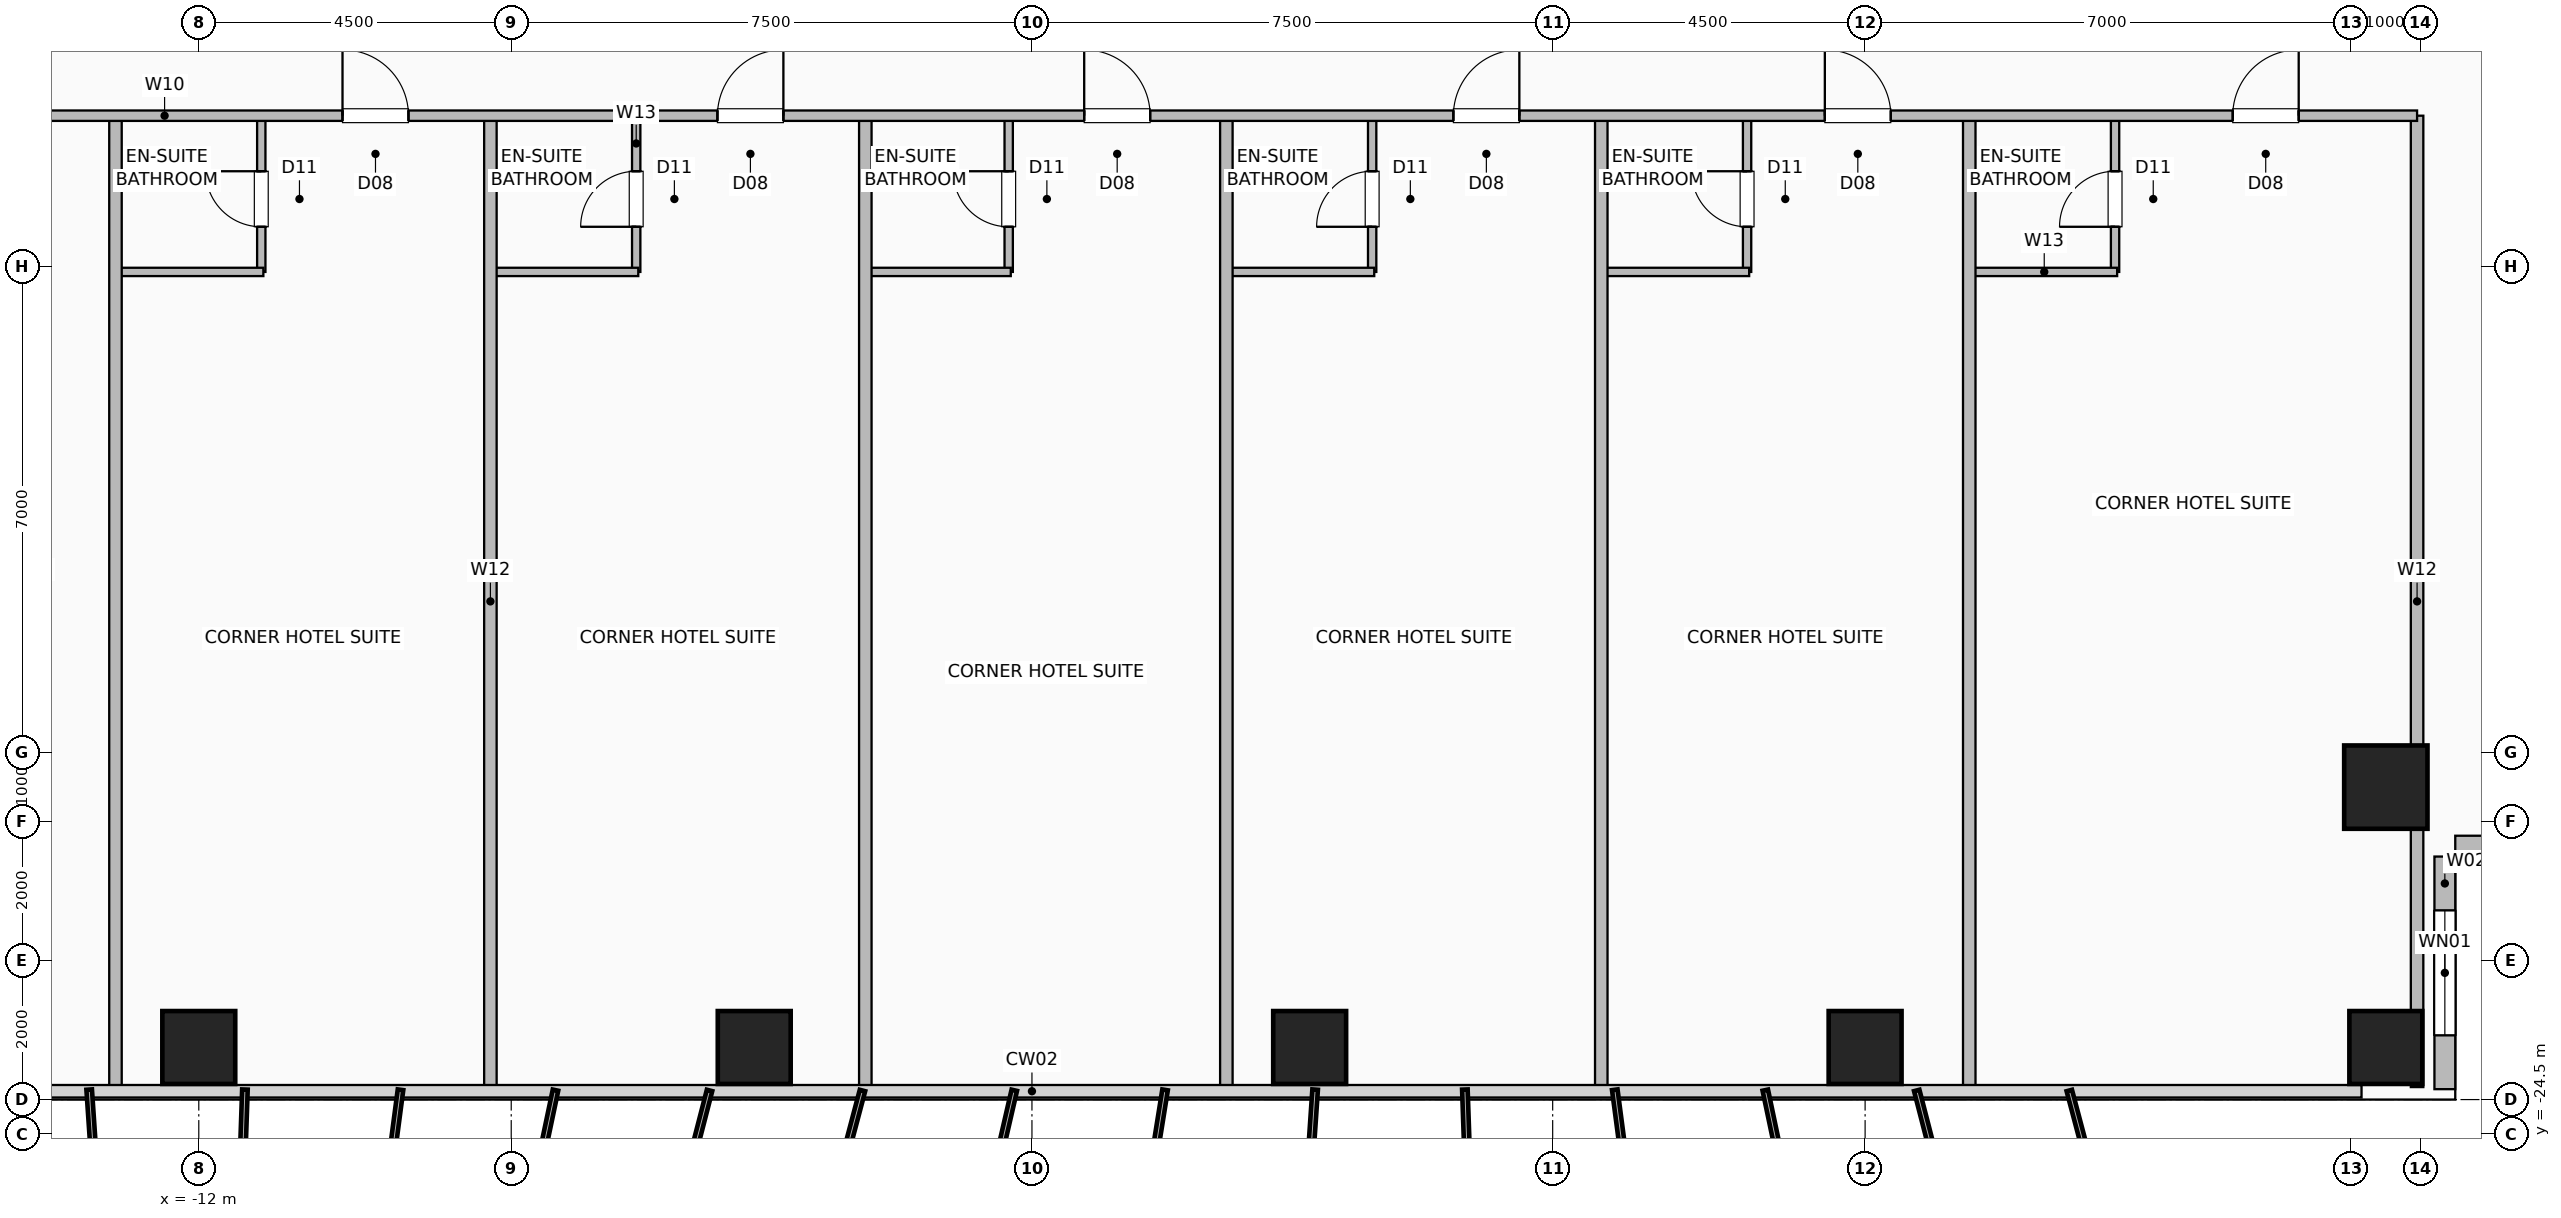
"""IFC4 building model, lengths in metres.
Left out: names, types, materials, properties, quantities, classifications, styles, units other than length and angle.
Written with IfcOpenShell. Run it as: python <this file> out.ifc"""

import sys

from ifc_helpers import new_model, si_unit, direction, frame, frame_2d, origin, origin_2d, place, context, subcontext, project, spatial, rectangle, hollow_rectangle, extrude, element, fill, save


model = new_model("IFC4")
c1 = context("Model", 3, precision=1e-05, world=origin(), true_north=direction((0.0, 1.0)))
c2 = subcontext(c1, "Body", "Model", "MODEL_VIEW")
j1 = project(units=[si_unit("LENGTHUNIT", "METRE"), si_unit("PLANEANGLEUNIT", "RADIAN")], contexts=[c1])
p1 = place(None, origin())
s1 = spatial("IfcSite", under=j1, at=p1, CompositionType="ELEMENT")
p2 = place(p1, origin())
s2 = spatial("IfcBuilding", under=s1, at=p2, CompositionType="ELEMENT")
p3 = place(p2, frame((0.0, 0.0, 79.5)))
s3 = spatial("IfcBuildingStorey", under=s2, at=p3, CompositionType="ELEMENT", Elevation=79.5)
for number, where, z_axis, x_axis in (
    (1, (-12.0, -23.25, 0.0), (0.0, 0.0, 1.0), (1.0, 0.0, 0.0)),
    (2, (-4.0, -23.25, 0.0), (0.0, 0.0, 1.0), (1.0, 0.0, 0.0)),
    (3, (4.0, -23.25, 0.0), (0.0, 0.0, 1.0), (1.0, 0.0, 0.0)),
    (4, (12.0, -23.25, 0.0), (0.0, 0.0, 1.0), (1.0, 0.0, 0.0)),
    (5, (19.5, -23.25, 0.0), (0.0, 0.0, 1.0), (1.0, 0.0, 0.0)),
):
    element("IfcColumn", number, at=place(p3, frame(where, z_axis=z_axis, x_axis=x_axis)), inside=s3, PredefinedType="COLUMN", context=c2, shape_type="SweptSolid", body=[
        extrude(hollow_rectangle(XDim=1.05, YDim=1.05, WallThickness=0.05, at=origin_2d()), origin(), (0.0, 0.0, 1.0), 3.5),
    ])
p4 = place(p3, frame((19.5, -19.5, 0.0), z_axis=(0.0, 0.0, 1.0), x_axis=(1.0, 0.0, 0.0)))
e6 = element("IfcColumn", 6, at=p4, inside=s3, PredefinedType="COLUMN", context=c2, shape_type="SweptSolid", body=[
    extrude(hollow_rectangle(XDim=1.2, YDim=1.2, WallThickness=0.055, at=origin_2d()), origin(), (0.0, 0.0, 1.0), 3.5),
])
p5 = place(p3, frame((20.35, -23.85, 0.0), z_axis=(0.0, 0.0, 1.0), x_axis=(0.0, 1.0, 0.0)))
e7 = element("IfcWall", 7, at=p5, inside=s3, PredefinedType="SOLIDWALL", context=c2, shape_type="SweptSolid", body=[
    extrude(rectangle(XDim=3.35, YDim=0.3, at=frame_2d((1.675, 0.0))), origin(), (0.0, 0.0, 1.0), 3.15),
])
p6 = place(p5, frame((0.775, 0.0, 0.9)))
e8 = element("IfcOpeningElement", 8, at=p6, cuts=e7, PredefinedType="OPENING", context=c2, shape_type="SweptSolid", body=[
    extrude(rectangle(XDim=1.8, YDim=1.8, at=frame_2d((0.9, 0.9))), frame((0.0, 0.16, 0.0), z_axis=(0.0, -1.0, 0.0), x_axis=(1.0, 0.0, 0.0)), (0.0, 0.0, 1.0), 0.32),
])
p7 = place(p3, frame((23.85, -20.35, 0.0), z_axis=(0.0, 0.0, 1.0), x_axis=(-1.0, 0.0, 0.0)))
e9 = element("IfcWall", 9, at=p7, inside=s3, PredefinedType="SOLIDWALL", context=c2, shape_type="SweptSolid", body=[
    extrude(rectangle(XDim=3.35, YDim=0.3, at=frame_2d((1.675, 0.0))), origin(), (0.0, 0.0, 1.0), 3.15),
])
p8 = place(p3, frame((-11.1, -12.08, 0.0), z_axis=(0.0, 0.0, 1.0), x_axis=(0.0, 1.0, 0.0)))
e10 = element("IfcWall", 10, at=p8, inside=s3, PredefinedType="PLUMBINGWALL", context=c2, shape_type="SweptSolid", body=[
    extrude(rectangle(XDim=2.25, YDim=0.12, at=frame_2d((1.125, 0.0))), origin(), (0.0, 0.0, 1.0), 3.15),
])
p9 = place(p8, frame((0.65, 0.0, 0.0)))
e11 = element("IfcOpeningElement", 11, at=p9, cuts=e10, PredefinedType="OPENING", context=c2, shape_type="SweptSolid", body=[
    extrude(rectangle(XDim=0.8, YDim=2.05, at=frame_2d((0.4, 1.025))), frame((0.0, 0.07, 0.0), z_axis=(0.0, -1.0, 0.0), x_axis=(1.0, 0.0, 0.0)), (0.0, 0.0, 1.0), 0.14),
])
p10 = place(p3, frame((-13.17, -12.08, 0.0), z_axis=(0.0, 0.0, 1.0), x_axis=(1.0, 0.0, 0.0)))
e12 = element("IfcWall", 12, at=p10, inside=s3, PredefinedType="PLUMBINGWALL", context=c2, shape_type="SweptSolid", body=[
    extrude(rectangle(XDim=2.1, YDim=0.12, at=frame_2d((1.05, 0.0))), origin(), (0.0, 0.0, 1.0), 3.15),
])
p11 = place(p3, frame((-5.7, -12.08, 0.0), z_axis=(0.0, 0.0, 1.0), x_axis=(0.0, 1.0, 0.0)))
e13 = element("IfcWall", 13, at=p11, inside=s3, PredefinedType="PLUMBINGWALL", context=c2, shape_type="SweptSolid", body=[
    extrude(rectangle(XDim=2.25, YDim=0.12, at=frame_2d((1.125, 0.0))), origin(), (0.0, 0.0, 1.0), 3.15),
])
p12 = place(p11, frame((0.65, 0.0, 0.0)))
e14 = element("IfcOpeningElement", 14, at=p12, cuts=e13, PredefinedType="OPENING", context=c2, shape_type="SweptSolid", body=[
    extrude(rectangle(XDim=0.8, YDim=2.05, at=frame_2d((0.4, 1.025))), frame((0.0, 0.07, 0.0), z_axis=(0.0, -1.0, 0.0), x_axis=(1.0, 0.0, 0.0)), (0.0, 0.0, 1.0), 0.14),
])
p13 = place(p3, frame((-7.77, -12.08, 0.0), z_axis=(0.0, 0.0, 1.0), x_axis=(1.0, 0.0, 0.0)))
e15 = element("IfcWall", 15, at=p13, inside=s3, PredefinedType="PLUMBINGWALL", context=c2, shape_type="SweptSolid", body=[
    extrude(rectangle(XDim=2.1, YDim=0.12, at=frame_2d((1.05, 0.0))), origin(), (0.0, 0.0, 1.0), 3.15),
])
p14 = place(p3, frame((-0.335, -12.08, 0.0), z_axis=(0.0, 0.0, 1.0), x_axis=(0.0, 1.0, 0.0)))
e16 = element("IfcWall", 16, at=p14, inside=s3, PredefinedType="PLUMBINGWALL", context=c2, shape_type="SweptSolid", body=[
    extrude(rectangle(XDim=2.25, YDim=0.12, at=frame_2d((1.125, 0.0))), origin(), (0.0, 0.0, 1.0), 3.15),
])
p15 = place(p14, frame((0.65, 0.0, 0.0)))
e17 = element("IfcOpeningElement", 17, at=p15, cuts=e16, PredefinedType="OPENING", context=c2, shape_type="SweptSolid", body=[
    extrude(rectangle(XDim=0.8, YDim=2.05, at=frame_2d((0.4, 1.025))), frame((0.0, 0.07, 0.0), z_axis=(0.0, -1.0, 0.0), x_axis=(1.0, 0.0, 0.0)), (0.0, 0.0, 1.0), 0.14),
])
p16 = place(p3, frame((-2.37, -12.08, 0.0), z_axis=(0.0, 0.0, 1.0), x_axis=(1.0, 0.0, 0.0)))
e18 = element("IfcWall", 18, at=p16, inside=s3, PredefinedType="PLUMBINGWALL", context=c2, shape_type="SweptSolid", body=[
    extrude(rectangle(XDim=2.065, YDim=0.12, at=frame_2d((1.033, 0.0))), origin(), (0.0, 0.0, 1.0), 3.15),
])
p17 = place(p3, frame((4.9, -12.08, 0.0), z_axis=(0.0, 0.0, 1.0), x_axis=(0.0, 1.0, 0.0)))
e19 = element("IfcWall", 19, at=p17, inside=s3, PredefinedType="PLUMBINGWALL", context=c2, shape_type="SweptSolid", body=[
    extrude(rectangle(XDim=2.25, YDim=0.12, at=frame_2d((1.125, 0.0))), origin(), (0.0, 0.0, 1.0), 3.15),
])
p18 = place(p17, frame((0.65, 0.0, 0.0)))
e20 = element("IfcOpeningElement", 20, at=p18, cuts=e19, PredefinedType="OPENING", context=c2, shape_type="SweptSolid", body=[
    extrude(rectangle(XDim=0.8, YDim=2.05, at=frame_2d((0.4, 1.025))), frame((0.0, 0.07, 0.0), z_axis=(0.0, -1.0, 0.0), x_axis=(1.0, 0.0, 0.0)), (0.0, 0.0, 1.0), 0.14),
])
p19 = place(p3, frame((2.83, -12.08, 0.0), z_axis=(0.0, 0.0, 1.0), x_axis=(1.0, 0.0, 0.0)))
e21 = element("IfcWall", 21, at=p19, inside=s3, PredefinedType="PLUMBINGWALL", context=c2, shape_type="SweptSolid", body=[
    extrude(rectangle(XDim=2.1, YDim=0.12, at=frame_2d((1.05, 0.0))), origin(), (0.0, 0.0, 1.0), 3.15),
])
p20 = place(p3, frame((10.3, -12.08, 0.0), z_axis=(0.0, 0.0, 1.0), x_axis=(0.0, 1.0, 0.0)))
e22 = element("IfcWall", 22, at=p20, inside=s3, PredefinedType="PLUMBINGWALL", context=c2, shape_type="SweptSolid", body=[
    extrude(rectangle(XDim=2.25, YDim=0.12, at=frame_2d((1.125, 0.0))), origin(), (0.0, 0.0, 1.0), 3.15),
])
p21 = place(p20, frame((0.65, 0.0, 0.0)))
e23 = element("IfcOpeningElement", 23, at=p21, cuts=e22, PredefinedType="OPENING", context=c2, shape_type="SweptSolid", body=[
    extrude(rectangle(XDim=0.8, YDim=2.05, at=frame_2d((0.4, 1.025))), frame((0.0, 0.07, 0.0), z_axis=(0.0, -1.0, 0.0), x_axis=(1.0, 0.0, 0.0)), (0.0, 0.0, 1.0), 0.14),
])
p22 = place(p3, frame((8.23, -12.08, 0.0), z_axis=(0.0, 0.0, 1.0), x_axis=(1.0, 0.0, 0.0)))
e24 = element("IfcWall", 24, at=p22, inside=s3, PredefinedType="PLUMBINGWALL", context=c2, shape_type="SweptSolid", body=[
    extrude(rectangle(XDim=2.1, YDim=0.12, at=frame_2d((1.05, 0.0))), origin(), (0.0, 0.0, 1.0), 3.15),
])
p23 = place(p3, frame((15.6, -12.08, 0.0), z_axis=(0.0, 0.0, 1.0), x_axis=(0.0, 1.0, 0.0)))
e25 = element("IfcWall", 25, at=p23, inside=s3, PredefinedType="PLUMBINGWALL", context=c2, shape_type="SweptSolid", body=[
    extrude(rectangle(XDim=2.25, YDim=0.12, at=frame_2d((1.125, 0.0))), origin(), (0.0, 0.0, 1.0), 3.15),
])
p24 = place(p23, frame((0.65, 0.0, 0.0)))
e26 = element("IfcOpeningElement", 26, at=p24, cuts=e25, PredefinedType="OPENING", context=c2, shape_type="SweptSolid", body=[
    extrude(rectangle(XDim=0.8, YDim=2.05, at=frame_2d((0.4, 1.025))), frame((0.0, 0.07, 0.0), z_axis=(0.0, -1.0, 0.0), x_axis=(1.0, 0.0, 0.0)), (0.0, 0.0, 1.0), 0.14),
])
p25 = place(p3, frame((13.53, -12.08, 0.0), z_axis=(0.0, 0.0, 1.0), x_axis=(1.0, 0.0, 0.0)))
e27 = element("IfcWall", 27, at=p25, inside=s3, PredefinedType="PLUMBINGWALL", context=c2, shape_type="SweptSolid", body=[
    extrude(rectangle(XDim=2.1, YDim=0.12, at=frame_2d((1.05, 0.0))), origin(), (0.0, 0.0, 1.0), 3.15),
])
for number, where, z_axis, x_axis in (
    (28, (-13.2, -23.82, 0.0), (0.0, 0.0, 1.0), (0.0, 1.0, 0.0)),
    (29, (-7.8, -23.82, 0.0), (0.0, 0.0, 1.0), (0.0, 1.0, 0.0)),
    (30, (-2.4, -23.82, 0.0), (0.0, 0.0, 1.0), (0.0, 1.0, 0.0)),
    (31, (2.8, -23.82, 0.0), (0.0, 0.0, 1.0), (0.0, 1.0, 0.0)),
    (32, (8.2, -23.82, 0.0), (0.0, 0.0, 1.0), (0.0, 1.0, 0.0)),
    (33, (13.5, -23.82, 0.0), (0.0, 0.0, 1.0), (0.0, 1.0, 0.0)),
    (34, (19.95, -23.82, 0.0), (0.0, 0.0, 1.0), (0.0, 1.0, 0.0)),
):
    element("IfcWall", number, at=place(p3, frame(where, z_axis=z_axis, x_axis=x_axis)), inside=s3, PredefinedType="PARTITIONING", context=c2, shape_type="SweptSolid", body=[
        extrude(rectangle(XDim=13.99, YDim=0.18, at=frame_2d((6.995, 0.0))), origin(), (0.0, 0.0, 1.0), 3.15),
    ])
p26 = place(p3, frame((-19.95, -9.83, 0.0), z_axis=(0.0, 0.0, 1.0), x_axis=(1.0, 0.0, 0.0)))
e35 = element("IfcWall", 35, at=p26, inside=s3, PredefinedType="PARTITIONING", context=c2, shape_type="SweptSolid", body=[
    extrude(rectangle(XDim=39.9, YDim=0.15, at=frame_2d((19.95, 0.0))), origin(), (0.0, 0.0, 1.0), 3.15),
])
p27 = place(p26, frame((3.945, 0.0, 0.0)))
e36 = element("IfcOpeningElement", 36, at=p27, cuts=e35, PredefinedType="OPENING", context=c2, shape_type="SweptSolid", body=[
    extrude(rectangle(XDim=0.95, YDim=2.08, at=frame_2d((0.475, 1.04))), frame((0.0, 0.085, 0.0), z_axis=(0.0, -1.0, 0.0), x_axis=(1.0, 0.0, 0.0)), (0.0, 0.0, 1.0), 0.17),
])
p28 = place(p26, frame((10.02, 0.0, 0.0)))
e37 = element("IfcOpeningElement", 37, at=p28, cuts=e35, PredefinedType="OPENING", context=c2, shape_type="SweptSolid", body=[
    extrude(rectangle(XDim=0.95, YDim=2.08, at=frame_2d((0.475, 1.04))), frame((0.0, 0.085, 0.0), z_axis=(0.0, -1.0, 0.0), x_axis=(1.0, 0.0, 0.0)), (0.0, 0.0, 1.0), 0.17),
])
p29 = place(p26, frame((15.42, 0.0, 0.0)))
e38 = element("IfcOpeningElement", 38, at=p29, cuts=e35, PredefinedType="OPENING", context=c2, shape_type="SweptSolid", body=[
    extrude(rectangle(XDim=0.95, YDim=2.08, at=frame_2d((0.475, 1.04))), frame((0.0, 0.085, 0.0), z_axis=(0.0, -1.0, 0.0), x_axis=(1.0, 0.0, 0.0)), (0.0, 0.0, 1.0), 0.17),
])
p30 = place(p26, frame((20.702, 0.0, 0.0)))
e39 = element("IfcOpeningElement", 39, at=p30, cuts=e35, PredefinedType="OPENING", context=c2, shape_type="SweptSolid", body=[
    extrude(rectangle(XDim=0.95, YDim=2.08, at=frame_2d((0.475, 1.04))), frame((0.0, 0.085, 0.0), z_axis=(0.0, -1.0, 0.0), x_axis=(1.0, 0.0, 0.0)), (0.0, 0.0, 1.0), 0.17),
])
p31 = place(p26, frame((26.02, 0.0, 0.0)))
e40 = element("IfcOpeningElement", 40, at=p31, cuts=e35, PredefinedType="OPENING", context=c2, shape_type="SweptSolid", body=[
    extrude(rectangle(XDim=0.95, YDim=2.08, at=frame_2d((0.475, 1.04))), frame((0.0, 0.085, 0.0), z_axis=(0.0, -1.0, 0.0), x_axis=(1.0, 0.0, 0.0)), (0.0, 0.0, 1.0), 0.17),
])
p32 = place(p26, frame((31.37, 0.0, 0.0)))
e41 = element("IfcOpeningElement", 41, at=p32, cuts=e35, PredefinedType="OPENING", context=c2, shape_type="SweptSolid", body=[
    extrude(rectangle(XDim=0.95, YDim=2.08, at=frame_2d((0.475, 1.04))), frame((0.0, 0.085, 0.0), z_axis=(0.0, -1.0, 0.0), x_axis=(1.0, 0.0, 0.0)), (0.0, 0.0, 1.0), 0.17),
])
p33 = place(p26, frame((37.245, 0.0, 0.0)))
e42 = element("IfcOpeningElement", 42, at=p33, cuts=e35, PredefinedType="OPENING", context=c2, shape_type="SweptSolid", body=[
    extrude(rectangle(XDim=0.95, YDim=2.08, at=frame_2d((0.475, 1.04))), frame((0.0, 0.085, 0.0), z_axis=(0.0, -1.0, 0.0), x_axis=(1.0, 0.0, 0.0)), (0.0, 0.0, 1.0), 0.17),
])
p34 = place(p6, origin())
e43 = element("IfcWindow", 43, at=p34, inside=s3, PartitioningType="SINGLE_PANEL", PredefinedType="WINDOW", context=c2, shape_type="SweptSolid", body=[
    extrude(rectangle(XDim=1.8, YDim=1.8, at=frame_2d((0.9, 0.9))), frame((0.0, 0.03, 0.0), z_axis=(0.0, -1.0, 0.0), x_axis=(1.0, 0.0, 0.0)), (0.0, 0.0, 1.0), 0.06),
])
fill(e8, e43)
p35 = place(p9, origin())
e44 = element("IfcDoor", 44, at=p35, inside=s3, OperationType="SINGLE_SWING_RIGHT", PredefinedType="DOOR", context=c2, shape_type="SweptSolid", body=[
    extrude(rectangle(XDim=0.8, YDim=2.05, at=frame_2d((0.4, 1.025))), frame((0.0, 0.025, 0.0), z_axis=(0.0, -1.0, 0.0), x_axis=(1.0, 0.0, 0.0)), (0.0, 0.0, 1.0), 0.05),
])
fill(e11, e44)
p36 = place(p12, origin())
e45 = element("IfcDoor", 45, at=p36, inside=s3, OperationType="SINGLE_SWING_LEFT", PredefinedType="DOOR", context=c2, shape_type="SweptSolid", body=[
    extrude(rectangle(XDim=0.8, YDim=2.05, at=frame_2d((0.4, 1.025))), frame((0.0, 0.025, 0.0), z_axis=(0.0, -1.0, 0.0), x_axis=(1.0, 0.0, 0.0)), (0.0, 0.0, 1.0), 0.05),
])
fill(e14, e45)
p37 = place(p15, origin())
e46 = element("IfcDoor", 46, at=p37, inside=s3, OperationType="SINGLE_SWING_RIGHT", PredefinedType="DOOR", context=c2, shape_type="SweptSolid", body=[
    extrude(rectangle(XDim=0.8, YDim=2.05, at=frame_2d((0.4, 1.025))), frame((0.0, 0.025, 0.0), z_axis=(0.0, -1.0, 0.0), x_axis=(1.0, 0.0, 0.0)), (0.0, 0.0, 1.0), 0.05),
])
fill(e17, e46)
p38 = place(p18, origin())
e47 = element("IfcDoor", 47, at=p38, inside=s3, OperationType="SINGLE_SWING_LEFT", PredefinedType="DOOR", context=c2, shape_type="SweptSolid", body=[
    extrude(rectangle(XDim=0.8, YDim=2.05, at=frame_2d((0.4, 1.025))), frame((0.0, 0.025, 0.0), z_axis=(0.0, -1.0, 0.0), x_axis=(1.0, 0.0, 0.0)), (0.0, 0.0, 1.0), 0.05),
])
fill(e20, e47)
p39 = place(p21, origin())
e48 = element("IfcDoor", 48, at=p39, inside=s3, OperationType="SINGLE_SWING_RIGHT", PredefinedType="DOOR", context=c2, shape_type="SweptSolid", body=[
    extrude(rectangle(XDim=0.8, YDim=2.05, at=frame_2d((0.4, 1.025))), frame((0.0, 0.025, 0.0), z_axis=(0.0, -1.0, 0.0), x_axis=(1.0, 0.0, 0.0)), (0.0, 0.0, 1.0), 0.05),
])
fill(e23, e48)
p40 = place(p24, origin())
e49 = element("IfcDoor", 49, at=p40, inside=s3, OperationType="SINGLE_SWING_LEFT", PredefinedType="DOOR", context=c2, shape_type="SweptSolid", body=[
    extrude(rectangle(XDim=0.8, YDim=2.05, at=frame_2d((0.4, 1.025))), frame((0.0, 0.025, 0.0), z_axis=(0.0, -1.0, 0.0), x_axis=(1.0, 0.0, 0.0)), (0.0, 0.0, 1.0), 0.05),
])
fill(e26, e49)
p41 = place(p28, origin())
e50 = element("IfcDoor", 50, at=p41, inside=s3, OperationType="SINGLE_SWING_LEFT", PredefinedType="DOOR", context=c2, shape_type="SweptSolid", body=[
    extrude(rectangle(XDim=0.95, YDim=2.08, at=frame_2d((0.475, 1.04))), frame((0.0, 0.025, 0.0), z_axis=(0.0, -1.0, 0.0), x_axis=(1.0, 0.0, 0.0)), (0.0, 0.0, 1.0), 0.05),
])
fill(e37, e50)
p42 = place(p29, origin())
e51 = element("IfcDoor", 51, at=p42, inside=s3, OperationType="SINGLE_SWING_RIGHT", PredefinedType="DOOR", context=c2, shape_type="SweptSolid", body=[
    extrude(rectangle(XDim=0.95, YDim=2.08, at=frame_2d((0.475, 1.04))), frame((0.0, 0.025, 0.0), z_axis=(0.0, -1.0, 0.0), x_axis=(1.0, 0.0, 0.0)), (0.0, 0.0, 1.0), 0.05),
])
fill(e38, e51)
p43 = place(p30, origin())
e52 = element("IfcDoor", 52, at=p43, inside=s3, OperationType="SINGLE_SWING_LEFT", PredefinedType="DOOR", context=c2, shape_type="SweptSolid", body=[
    extrude(rectangle(XDim=0.95, YDim=2.08, at=frame_2d((0.475, 1.04))), frame((0.0, 0.025, 0.0), z_axis=(0.0, -1.0, 0.0), x_axis=(1.0, 0.0, 0.0)), (0.0, 0.0, 1.0), 0.05),
])
fill(e39, e52)
p44 = place(p31, origin())
e53 = element("IfcDoor", 53, at=p44, inside=s3, OperationType="SINGLE_SWING_RIGHT", PredefinedType="DOOR", context=c2, shape_type="SweptSolid", body=[
    extrude(rectangle(XDim=0.95, YDim=2.08, at=frame_2d((0.475, 1.04))), frame((0.0, 0.025, 0.0), z_axis=(0.0, -1.0, 0.0), x_axis=(1.0, 0.0, 0.0)), (0.0, 0.0, 1.0), 0.05),
])
fill(e40, e53)
p45 = place(p32, origin())
e54 = element("IfcDoor", 54, at=p45, inside=s3, OperationType="SINGLE_SWING_LEFT", PredefinedType="DOOR", context=c2, shape_type="SweptSolid", body=[
    extrude(rectangle(XDim=0.95, YDim=2.08, at=frame_2d((0.475, 1.04))), frame((0.0, 0.025, 0.0), z_axis=(0.0, -1.0, 0.0), x_axis=(1.0, 0.0, 0.0)), (0.0, 0.0, 1.0), 0.05),
])
fill(e41, e54)
p46 = place(p33, origin())
e55 = element("IfcDoor", 55, at=p46, inside=s3, OperationType="SINGLE_SWING_RIGHT", PredefinedType="DOOR", context=c2, shape_type="SweptSolid", body=[
    extrude(rectangle(XDim=0.95, YDim=2.08, at=frame_2d((0.475, 1.04))), frame((0.0, 0.025, 0.0), z_axis=(0.0, -1.0, 0.0), x_axis=(1.0, 0.0, 0.0)), (0.0, 0.0, 1.0), 0.05),
])
fill(e42, e55)
save(model, sys.argv[1])
